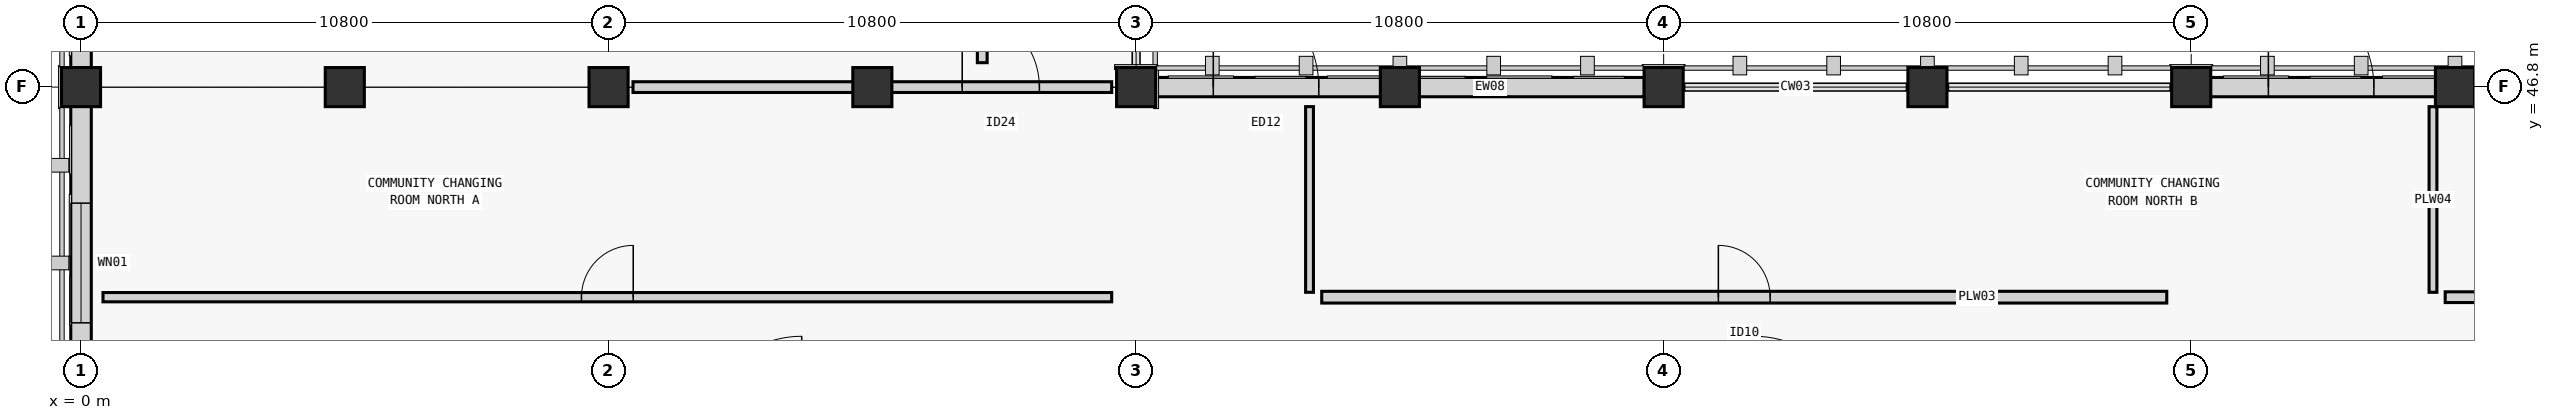
"""IFC4 building model, lengths in metres.
Left out: names, types, materials, properties, quantities, classifications, styles, units other than length and angle.
Written with IfcOpenShell. Run it as: python <this file> out.ifc"""

import sys

from ifc_helpers import new_model, si_unit, direction, frame, frame_2d, origin, origin_2d, place, context, subcontext, project, spatial, rectangle, extrude, element, fill, save


model = new_model("IFC4")
c1 = context("Model", 3, precision=1e-05, world=origin(), true_north=direction((0.0, 1.0)))
c2 = subcontext(c1, "Body", "Model", "MODEL_VIEW")
j1 = project(units=[si_unit("LENGTHUNIT", "METRE"), si_unit("PLANEANGLEUNIT", "RADIAN")], contexts=[c1])
p1 = place(None, origin())
s1 = spatial("IfcSite", under=j1, at=p1, CompositionType="ELEMENT")
p2 = place(p1, origin())
s2 = spatial("IfcBuilding", under=s1, at=p2, CompositionType="ELEMENT")
p3 = place(p2, origin())
s3 = spatial("IfcBuildingStorey", under=s2, at=p3, CompositionType="ELEMENT", Elevation=0.0)
for number, where, z_axis, x_axis in (
    (1, (0.0, 46.8, -0.3), (0.0, 0.0, 1.0), (1.0, 0.0, 0.0)),
    (2, (10.8, 46.8, -0.3), (0.0, 0.0, 1.0), (1.0, 0.0, 0.0)),
    (3, (21.6, 46.8, -0.3), (0.0, 0.0, 1.0), (1.0, 0.0, 0.0)),
    (4, (32.4, 46.8, -0.3), (0.0, 0.0, 1.0), (1.0, 0.0, 0.0)),
    (5, (43.2, 46.8, -0.3), (0.0, 0.0, 1.0), (1.0, 0.0, 0.0)),
    (6, (5.4, 46.8, -0.3), (0.0, 0.0, 1.0), (1.0, 0.0, 0.0)),
    (7, (16.2, 46.8, -0.3), (0.0, 0.0, 1.0), (1.0, 0.0, 0.0)),
    (8, (27.0, 46.8, -0.3), (0.0, 0.0, 1.0), (1.0, 0.0, 0.0)),
    (9, (37.8, 46.8, -0.3), (0.0, 0.0, 1.0), (1.0, 0.0, 0.0)),
    (10, (48.6, 46.8, -0.3), (0.0, 0.0, 1.0), (1.0, 0.0, 0.0)),
):
    element("IfcColumn", number, at=place(p3, frame(where, z_axis=z_axis, x_axis=x_axis)), inside=s3, PredefinedType="COLUMN", context=c2, shape_type="SweptSolid", body=[
        extrude(rectangle(XDim=0.8, YDim=0.8, at=origin_2d()), origin(), (0.0, 0.0, 1.0), 5.7),
    ])
p4 = place(p3, frame((21.996, 46.8, 0.0), z_axis=(0.0, 0.0, 1.0), x_axis=(1.0, 0.0, 0.0)))
e11 = element("IfcWall", 11, at=p4, inside=s3, PredefinedType="STANDARD", context=c2, shape_type="SweptSolid", body=[
    extrude(rectangle(XDim=10.008, YDim=0.395, at=frame_2d((5.004, 0.0))), origin(), (0.0, 0.0, 1.0), 4.405),
])
p5 = place(p4, frame((1.184, 0.0, 0.0)))
e12 = element("IfcOpeningElement", 12, at=p5, cuts=e11, PredefinedType="OPENING", context=c2, shape_type="SweptSolid", body=[
    extrude(rectangle(XDim=2.16, YDim=2.38, at=frame_2d((1.08, 1.19))), frame((0.0, 0.198, 0.0), z_axis=(0.0, -1.0, 0.0), x_axis=(1.0, 0.0, 0.0)), (0.0, 0.0, 1.0), 0.395),
])
p6 = place(p3, frame((43.596, 46.8, 0.0), z_axis=(0.0, 0.0, 1.0), x_axis=(1.0, 0.0, 0.0)))
e13 = element("IfcWall", 13, at=p6, inside=s3, PredefinedType="STANDARD", context=c2, shape_type="SweptSolid", body=[
    extrude(rectangle(XDim=10.008, YDim=0.395, at=frame_2d((5.004, 0.0))), origin(), (0.0, 0.0, 1.0), 4.405),
])
p7 = place(p6, frame((1.184, 0.0, 0.0)))
e14 = element("IfcOpeningElement", 14, at=p7, cuts=e13, PredefinedType="OPENING", context=c2, shape_type="SweptSolid", body=[
    extrude(rectangle(XDim=2.16, YDim=2.38, at=frame_2d((1.08, 1.19))), frame((0.0, 0.198, 0.0), z_axis=(0.0, -1.0, 0.0), x_axis=(1.0, 0.0, 0.0)), (0.0, 0.0, 1.0), 0.395),
])
p8 = place(p3, frame((0.0, 39.996, 0.0), z_axis=(0.0, 0.0, 1.0), x_axis=(0.0, 1.0, 0.0)))
e15 = element("IfcWall", 15, at=p8, inside=s3, PredefinedType="STANDARD", context=c2, shape_type="SweptSolid", body=[
    extrude(rectangle(XDim=6.408, YDim=0.42, at=frame_2d((3.204, 0.0))), origin(), (0.0, 0.0, 1.0), 4.495),
])
p9 = place(p8, frame((1.979, 0.0, 0.8)))
e16 = element("IfcOpeningElement", 16, at=p9, cuts=e15, PredefinedType="OPENING", context=c2, shape_type="SweptSolid", body=[
    extrude(rectangle(XDim=2.45, YDim=3.25, at=frame_2d((1.225, 1.625))), frame((0.0, 0.21, 0.0), z_axis=(0.0, -1.0, 0.0), x_axis=(1.0, 0.0, 0.0)), (0.0, 0.0, 1.0), 0.42),
])
p10 = place(p3, frame((0.0, 47.196, 0.0), z_axis=(0.0, 0.0, 1.0), x_axis=(0.0, 1.0, 0.0)))
e17 = element("IfcWall", 17, at=p10, inside=s3, PredefinedType="STANDARD", context=c2, shape_type="SweptSolid", body=[
    extrude(rectangle(XDim=6.488, YDim=0.42, at=frame_2d((3.244, 0.0))), origin(), (0.0, 0.0, 1.0), 4.515),
])
p11 = place(p10, frame((1.979, 0.0, 0.9)))
e18 = element("IfcOpeningElement", 18, at=p11, cuts=e17, PredefinedType="OPENING", context=c2, shape_type="SweptSolid", body=[
    extrude(rectangle(XDim=2.45, YDim=3.25, at=frame_2d((1.225, 1.625))), frame((0.0, 0.21, 0.0), z_axis=(0.0, -1.0, 0.0), x_axis=(1.0, 0.0, 0.0)), (0.0, 0.0, 1.0), 0.42),
])
p12 = place(p3, frame((11.3, 46.8, 0.0), z_axis=(0.0, 0.0, 1.0), x_axis=(1.0, 0.0, 0.0)))
e19 = element("IfcWall", 19, at=p12, inside=s3, PredefinedType="STANDARD", context=c2, shape_type="SweptSolid", body=[
    extrude(rectangle(XDim=9.8, YDim=0.22, at=frame_2d((4.9, 0.0))), origin(), (0.0, 0.0, 1.0), 4.2),
])
p13 = place(p12, frame((6.74, 0.0, 0.0)))
e20 = element("IfcOpeningElement", 20, at=p13, cuts=e19, PredefinedType="OPENING", context=c2, shape_type="SweptSolid", body=[
    extrude(rectangle(XDim=1.58, YDim=2.24, at=frame_2d((0.79, 1.12))), frame((0.0, 0.11, 0.0), z_axis=(0.0, -1.0, 0.0), x_axis=(1.0, 0.0, 0.0)), (0.0, 0.0, 1.0), 0.22),
])
p14 = place(p3, frame((0.45, 42.5, 0.0), z_axis=(0.0, 0.0, 1.0), x_axis=(1.0, 0.0, 0.0)))
e21 = element("IfcWall", 21, at=p14, inside=s3, PredefinedType="PLUMBINGWALL", context=c2, shape_type="SweptSolid", body=[
    extrude(rectangle(XDim=20.65, YDim=0.19, at=frame_2d((10.325, 0.0))), origin(), (0.0, 0.0, 1.0), 4.2),
])
p15 = place(p14, frame((9.795, 0.0, 0.0)))
e22 = element("IfcOpeningElement", 22, at=p15, cuts=e21, PredefinedType="OPENING", context=c2, shape_type="SweptSolid", body=[
    extrude(rectangle(XDim=1.06, YDim=2.14, at=frame_2d((0.53, 1.07))), frame((0.0, 0.095, 0.0), z_axis=(0.0, -1.0, 0.0), x_axis=(1.0, 0.0, 0.0)), (0.0, 0.0, 1.0), 0.19),
])
p16 = place(p3, frame((25.4, 42.5, 0.0), z_axis=(0.0, 0.0, 1.0), x_axis=(1.0, 0.0, 0.0)))
e23 = element("IfcWall", 23, at=p16, inside=s3, PredefinedType="PLUMBINGWALL", context=c2, shape_type="SweptSolid", body=[
    extrude(rectangle(XDim=17.3, YDim=0.24, at=frame_2d((8.65, 0.0))), origin(), (0.0, 0.0, 1.0), 4.2),
])
p17 = place(p16, frame((8.12, 0.0, 0.0)))
e24 = element("IfcOpeningElement", 24, at=p17, cuts=e23, PredefinedType="OPENING", context=c2, shape_type="SweptSolid", body=[
    extrude(rectangle(XDim=1.06, YDim=2.14, at=frame_2d((0.53, 1.07))), frame((0.0, 0.12, 0.0), z_axis=(0.0, -1.0, 0.0), x_axis=(1.0, 0.0, 0.0)), (0.0, 0.0, 1.0), 0.24),
])
p18 = place(p3, frame((48.4, 42.5, 0.0), z_axis=(0.0, 0.0, 1.0), x_axis=(1.0, 0.0, 0.0)))
e25 = element("IfcWall", 25, at=p18, inside=s3, PredefinedType="STANDARD", context=c2, shape_type="SweptSolid", body=[
    extrude(rectangle(XDim=15.9, YDim=0.22, at=frame_2d((7.95, 0.0))), origin(), (0.0, 0.0, 1.0), 4.2),
])
p19 = place(p18, frame((7.1, 0.0, 0.0)))
e26 = element("IfcOpeningElement", 26, at=p19, cuts=e25, PredefinedType="OPENING", context=c2, shape_type="SweptSolid", body=[
    extrude(rectangle(XDim=1.7, YDim=2.26, at=frame_2d((0.85, 1.13))), frame((0.0, 0.11, 0.0), z_axis=(0.0, -1.0, 0.0), x_axis=(1.0, 0.0, 0.0)), (0.0, 0.0, 1.0), 0.22),
])
for number, where, z_axis, x_axis in (
    (27, (25.15, 42.6, 0.0), (0.0, 0.0, 1.0), (0.0, 1.0, 0.0)),
    (28, (48.15, 42.6, 0.0), (0.0, 0.0, 1.0), (0.0, 1.0, 0.0)),
):
    element("IfcWall", number, at=place(p3, frame(where, z_axis=z_axis, x_axis=x_axis)), inside=s3, PredefinedType="PLUMBINGWALL", context=c2, shape_type="SweptSolid", body=[
        extrude(rectangle(XDim=3.8, YDim=0.16, at=frame_2d((1.9, 0.0))), origin(), (0.0, 0.0, 1.0), 4.2),
    ])
p20 = place(p3, frame((18.45, 47.3, 0.0), z_axis=(0.0, 0.0, 1.0), x_axis=(0.0, 1.0, 0.0)))
e29 = element("IfcWall", 29, at=p20, inside=s3, PredefinedType="STANDARD", context=c2, shape_type="SweptSolid", body=[
    extrude(rectangle(XDim=20.7, YDim=0.2, at=frame_2d((10.35, 0.0))), origin(), (0.0, 0.0, 1.0), 4.2),
])
p21 = place(p20, frame((9.57, 0.0, 0.0)))
e30 = element("IfcOpeningElement", 30, at=p21, cuts=e29, PredefinedType="OPENING", context=c2, shape_type="SweptSolid", body=[
    extrude(rectangle(XDim=1.56, YDim=2.25, at=frame_2d((0.78, 1.125))), frame((0.0, 0.1, 0.0), z_axis=(0.0, -1.0, 0.0), x_axis=(1.0, 0.0, 0.0)), (0.0, 0.0, 1.0), 0.2),
])
p22 = place(p5, origin())
e31 = element("IfcDoor", 31, at=p22, inside=s3, OperationType="SINGLE_SWING_LEFT", PredefinedType="DOOR", context=c2, shape_type="SweptSolid", body=[
    extrude(rectangle(XDim=2.16, YDim=2.38, at=frame_2d((1.08, 1.19))), frame((0.0, 0.025, 0.0), z_axis=(0.0, -1.0, 0.0), x_axis=(1.0, 0.0, 0.0)), (0.0, 0.0, 1.0), 0.05),
])
fill(e12, e31)
p23 = place(p7, origin())
e32 = element("IfcDoor", 32, at=p23, inside=s3, OperationType="SINGLE_SWING_LEFT", PredefinedType="DOOR", context=c2, shape_type="SweptSolid", body=[
    extrude(rectangle(XDim=2.16, YDim=2.38, at=frame_2d((1.08, 1.19))), frame((0.0, 0.025, 0.0), z_axis=(0.0, -1.0, 0.0), x_axis=(1.0, 0.0, 0.0)), (0.0, 0.0, 1.0), 0.05),
])
fill(e14, e32)
p24 = place(p9, origin())
e33 = element("IfcWindow", 33, at=p24, inside=s3, PartitioningType="SINGLE_PANEL", PredefinedType="WINDOW", context=c2, shape_type="SweptSolid", body=[
    extrude(rectangle(XDim=2.45, YDim=3.25, at=frame_2d((1.225, 1.625))), frame((0.0, 0.03, 0.0), z_axis=(0.0, -1.0, 0.0), x_axis=(1.0, 0.0, 0.0)), (0.0, 0.0, 1.0), 0.06),
])
fill(e16, e33)
p25 = place(p13, origin())
e34 = element("IfcDoor", 34, at=p25, inside=s3, OperationType="SINGLE_SWING_LEFT", PredefinedType="DOOR", context=c2, shape_type="SweptSolid", body=[
    extrude(rectangle(XDim=1.58, YDim=2.24, at=frame_2d((0.79, 1.12))), frame((0.0, 0.025, 0.0), z_axis=(0.0, -1.0, 0.0), x_axis=(1.0, 0.0, 0.0)), (0.0, 0.0, 1.0), 0.05),
])
fill(e20, e34)
p26 = place(p15, origin())
e35 = element("IfcDoor", 35, at=p26, inside=s3, OperationType="SINGLE_SWING_RIGHT", PredefinedType="DOOR", context=c2, shape_type="SweptSolid", body=[
    extrude(rectangle(XDim=1.06, YDim=2.14, at=frame_2d((0.53, 1.07))), frame((0.0, 0.025, 0.0), z_axis=(0.0, -1.0, 0.0), x_axis=(1.0, 0.0, 0.0)), (0.0, 0.0, 1.0), 0.05),
])
fill(e22, e35)
p27 = place(p17, origin())
e36 = element("IfcDoor", 36, at=p27, inside=s3, OperationType="SINGLE_SWING_LEFT", PredefinedType="DOOR", context=c2, shape_type="SweptSolid", body=[
    extrude(rectangle(XDim=1.06, YDim=2.14, at=frame_2d((0.53, 1.07))), frame((0.0, 0.025, 0.0), z_axis=(0.0, -1.0, 0.0), x_axis=(1.0, 0.0, 0.0)), (0.0, 0.0, 1.0), 0.05),
])
fill(e24, e36)
save(model, sys.argv[1])
